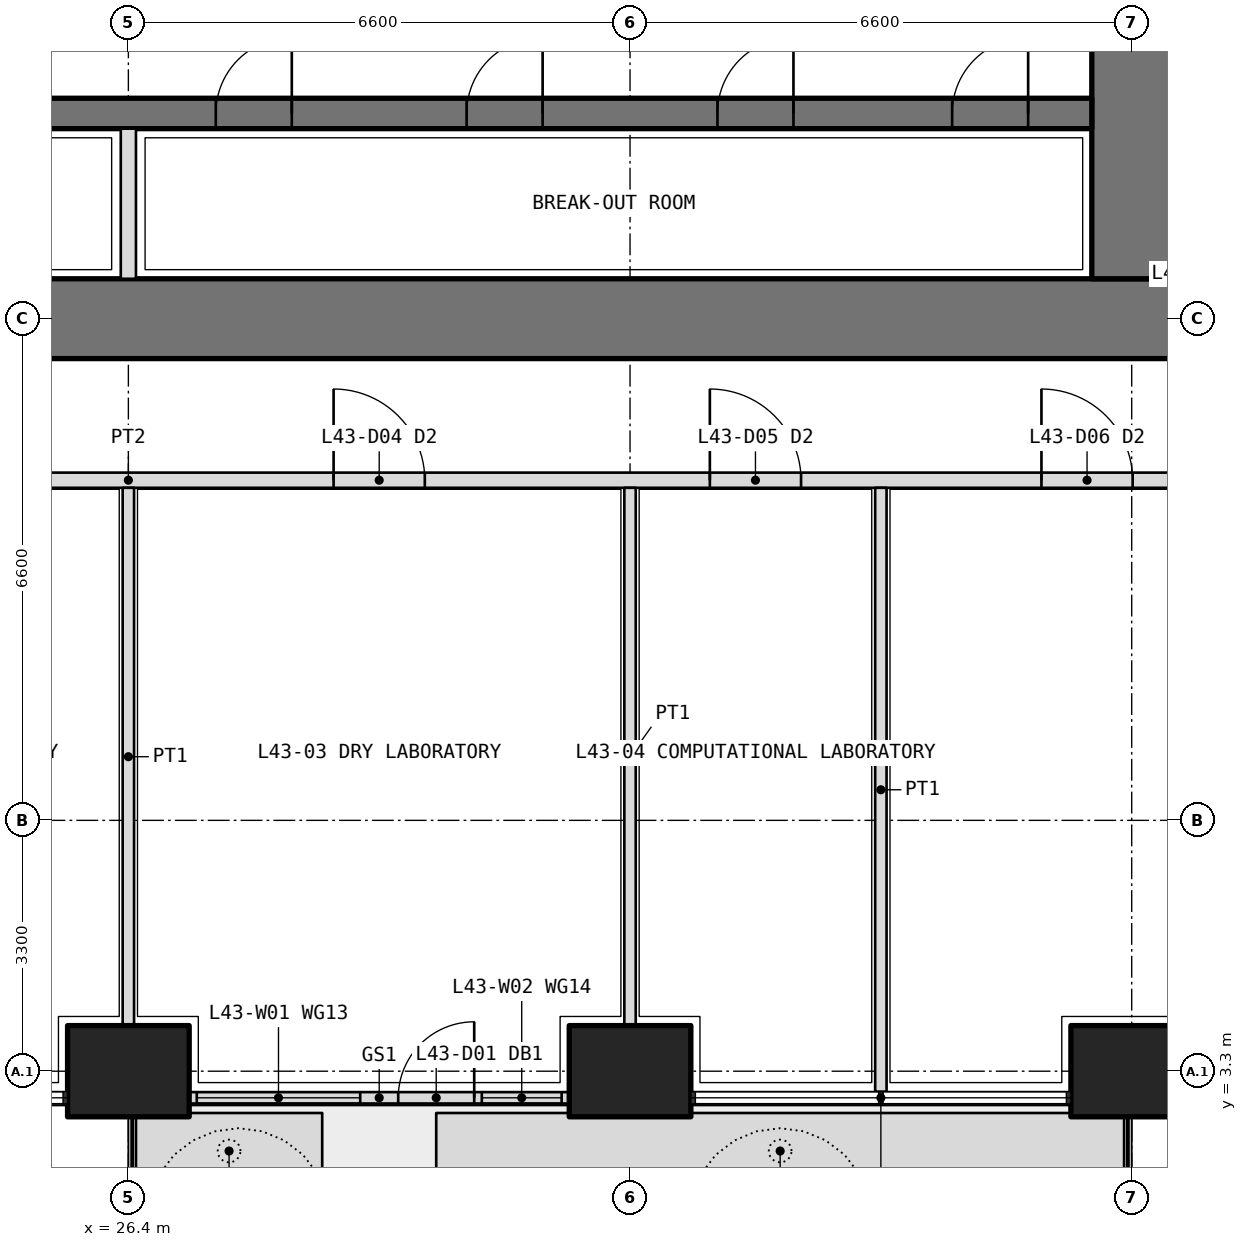
"""IFC4 building model, lengths in metres.
Left out: names, types, materials, properties, quantities, classifications, styles, units other than length and angle.
Written with IfcOpenShell. Run it as: python <this file> out.ifc"""

import sys

from ifc_helpers import new_model, si_unit, direction, frame, frame_2d, origin, origin_2d, place, context, subcontext, project, spatial, polyline, rectangle, outline, extrude, element, fill, save


model = new_model("IFC4")
c1 = context("Model", 3, precision=1e-05, world=origin(), true_north=direction((0.0, 1.0)))
c2 = subcontext(c1, "Body", "Model", "MODEL_VIEW")
j1 = project(units=[si_unit("LENGTHUNIT", "METRE"), si_unit("PLANEANGLEUNIT", "RADIAN")], contexts=[c1])
p1 = place(None, origin())
s1 = spatial("IfcSite", under=j1, at=p1, CompositionType="ELEMENT")
p2 = place(p1, origin())
s2 = spatial("IfcBuilding", under=s1, at=p2, CompositionType="ELEMENT")
p3 = place(p2, frame((0.0, 0.0, 189.3)))
s3 = spatial("IfcBuildingStorey", under=s2, at=p3, CompositionType="ELEMENT", Elevation=189.3)
for number, where, z_axis, x_axis in (
    (1, (26.4, 3.3, 0.0), (0.0, 0.0, 1.0), (1.0, 0.0, 0.0)),
    (2, (33.0, 3.3, 0.0), (0.0, 0.0, 1.0), (1.0, 0.0, 0.0)),
    (3, (39.6, 3.3, 0.0), (0.0, 0.0, 1.0), (1.0, 0.0, 0.0)),
):
    element("IfcColumn", number, at=place(p3, frame(where, z_axis=z_axis, x_axis=x_axis)), inside=s3, PredefinedType="COLUMN", context=c2, shape_type="SweptSolid", body=[
        extrude(rectangle(XDim=1.6, YDim=1.2, at=origin_2d()), origin(), (0.0, 0.0, 1.0), 4.2),
    ])
p4 = place(p3, origin())
e4 = element("IfcWall", 4, at=p4, inside=s3, PredefinedType="USERDEFINED", context=c2, shape_type="SweptSolid", body=[
    extrude(outline(polyline([(26.5, 1.75), (28.95, 1.75), (28.95, 2.75), (26.5, 2.75), (26.5, 1.75)]), holes=[polyline([(26.65, 1.9), (28.8, 1.9), (28.8, 2.6), (26.65, 2.6), (26.65, 1.9)])]), origin(), (0.0, 0.0, 1.0), 1.05),
])
p5 = place(p3, origin())
e5 = element("IfcWall", 5, at=p5, inside=s3, PredefinedType="USERDEFINED", context=c2, shape_type="SweptSolid", body=[
    extrude(outline(polyline([(30.45, 1.75), (39.5, 1.75), (39.5, 2.75), (30.45, 2.75), (30.45, 1.75)]), holes=[polyline([(30.6, 1.9), (39.35, 1.9), (39.35, 2.6), (30.6, 2.6), (30.6, 1.9)])]), origin(), (0.0, 0.0, 1.0), 1.05),
])
p6 = place(p3, frame((27.2, 2.95, 0.0), z_axis=(0.0, 0.0, 1.0), x_axis=(1.0, 0.0, 0.0)))
e6 = element("IfcWall", 6, at=p6, inside=s3, PredefinedType="SOLIDWALL", context=c2, shape_type="SweptSolid", body=[
    extrude(rectangle(XDim=5.0, YDim=0.15, at=frame_2d((2.5, 0.0))), origin(), (0.0, 0.0, 1.0), 2.7),
])
p7 = place(p6, frame((2.75, 0.0, 0.0)))
e7 = element("IfcOpeningElement", 7, at=p7, cuts=e6, PredefinedType="OPENING", context=c2, shape_type="SweptSolid", body=[
    extrude(rectangle(XDim=1.0, YDim=2.4, at=frame_2d((0.5, 1.2))), frame((0.0, 0.085, 0.0), z_axis=(0.0, -1.0, 0.0), x_axis=(1.0, 0.0, 0.0)), (0.0, 0.0, 1.0), 0.17),
])
p8 = place(p6, frame((0.1, 0.0, 0.1)))
e8 = element("IfcOpeningElement", 8, at=p8, cuts=e6, PredefinedType="OPENING", context=c2, shape_type="SweptSolid", body=[
    extrude(rectangle(XDim=2.15, YDim=2.3, at=frame_2d((1.075, 1.15))), frame((0.0, 0.085, 0.0), z_axis=(0.0, -1.0, 0.0), x_axis=(1.0, 0.0, 0.0)), (0.0, 0.0, 1.0), 0.17),
])
p9 = place(p6, frame((3.85, 0.0, 0.1)))
e9 = element("IfcOpeningElement", 9, at=p9, cuts=e6, PredefinedType="OPENING", context=c2, shape_type="SweptSolid", body=[
    extrude(rectangle(XDim=1.05, YDim=2.3, at=frame_2d((0.525, 1.15))), frame((0.0, 0.085, 0.0), z_axis=(0.0, -1.0, 0.0), x_axis=(1.0, 0.0, 0.0)), (0.0, 0.0, 1.0), 0.17),
])
p10 = place(p3, frame((12.675, 13.2, 0.0), z_axis=(0.0, 0.0, 1.0), x_axis=(1.0, 0.0, 0.0)))
e10 = element("IfcWall", 10, at=p10, inside=s3, PredefinedType="SHEAR", context=c2, shape_type="SweptSolid", body=[
    extrude(rectangle(XDim=27.45, YDim=1.05, at=frame_2d((13.725, 0.0))), origin(), (0.0, 0.0, 1.0), 4.2),
])
p11 = place(p3, frame((39.6, 13.725, 0.0), z_axis=(0.0, 0.0, 1.0), x_axis=(0.0, 1.0, 0.0)))
e11 = element("IfcWall", 11, at=p11, inside=s3, PredefinedType="SHEAR", context=c2, shape_type="SweptSolid", body=[
    extrude(rectangle(XDim=18.75, YDim=1.05, at=frame_2d((9.375, 0.0))), origin(), (0.0, 0.0, 1.0), 4.2),
])
p12 = place(p11, frame((3.025, 0.0, 0.0)))
e12 = element("IfcOpeningElement", 12, at=p12, cuts=e11, PredefinedType="OPENING", context=c2, shape_type="SweptSolid", body=[
    extrude(rectangle(XDim=1.6, YDim=2.1, at=frame_2d((0.8, 1.05))), frame((0.0, 0.535, 0.0), z_axis=(0.0, -1.0, 0.0), x_axis=(1.0, 0.0, 0.0)), (0.0, 0.0, 1.0), 1.07),
])
p13 = place(p11, frame((13.825, 0.0, 0.0)))
e13 = element("IfcOpeningElement", 13, at=p13, cuts=e11, PredefinedType="OPENING", context=c2, shape_type="SweptSolid", body=[
    extrude(rectangle(XDim=1.6, YDim=2.1, at=frame_2d((0.8, 1.05))), frame((0.0, 0.535, 0.0), z_axis=(0.0, -1.0, 0.0), x_axis=(1.0, 0.0, 0.0)), (0.0, 0.0, 1.0), 1.07),
])
p14 = place(p3, frame((13.725, 15.9, 0.0), z_axis=(0.0, 0.0, 1.0), x_axis=(1.0, 0.0, 0.0)))
e14 = element("IfcWall", 14, at=p14, inside=s3, PredefinedType="SHEAR", context=c2, shape_type="SweptSolid", body=[
    extrude(rectangle(XDim=25.35, YDim=0.4, at=frame_2d((12.675, 0.0))), origin(), (0.0, 0.0, 1.0), 4.2),
])
p15 = place(p14, frame((0.837, 0.0, 0.0)))
e15 = element("IfcOpeningElement", 15, at=p15, cuts=e14, PredefinedType="OPENING", context=c2, shape_type="SweptSolid", body=[
    extrude(rectangle(XDim=1.0, YDim=2.1, at=frame_2d((0.5, 1.05))), frame((0.0, 0.21, 0.0), z_axis=(0.0, -1.0, 0.0), x_axis=(1.0, 0.0, 0.0)), (0.0, 0.0, 1.0), 0.42),
])
p16 = place(p14, frame((3.925, 0.0, 0.0)))
e16 = element("IfcOpeningElement", 16, at=p16, cuts=e14, PredefinedType="OPENING", context=c2, shape_type="SweptSolid", body=[
    extrude(rectangle(XDim=1.0, YDim=2.1, at=frame_2d((0.5, 1.05))), frame((0.0, 0.21, 0.0), z_axis=(0.0, -1.0, 0.0), x_axis=(1.0, 0.0, 0.0)), (0.0, 0.0, 1.0), 0.42),
])
p17 = place(p14, frame((7.225, 0.0, 0.0)))
e17 = element("IfcOpeningElement", 17, at=p17, cuts=e14, PredefinedType="OPENING", context=c2, shape_type="SweptSolid", body=[
    extrude(rectangle(XDim=1.0, YDim=2.1, at=frame_2d((0.5, 1.05))), frame((0.0, 0.21, 0.0), z_axis=(0.0, -1.0, 0.0), x_axis=(1.0, 0.0, 0.0)), (0.0, 0.0, 1.0), 0.42),
])
p18 = place(p14, frame((10.525, 0.0, 0.0)))
e18 = element("IfcOpeningElement", 18, at=p18, cuts=e14, PredefinedType="OPENING", context=c2, shape_type="SweptSolid", body=[
    extrude(rectangle(XDim=1.0, YDim=2.1, at=frame_2d((0.5, 1.05))), frame((0.0, 0.21, 0.0), z_axis=(0.0, -1.0, 0.0), x_axis=(1.0, 0.0, 0.0)), (0.0, 0.0, 1.0), 0.42),
])
p19 = place(p14, frame((13.825, 0.0, 0.0)))
e19 = element("IfcOpeningElement", 19, at=p19, cuts=e14, PredefinedType="OPENING", context=c2, shape_type="SweptSolid", body=[
    extrude(rectangle(XDim=1.0, YDim=2.1, at=frame_2d((0.5, 1.05))), frame((0.0, 0.21, 0.0), z_axis=(0.0, -1.0, 0.0), x_axis=(1.0, 0.0, 0.0)), (0.0, 0.0, 1.0), 0.42),
])
p20 = place(p14, frame((17.125, 0.0, 0.0)))
e20 = element("IfcOpeningElement", 20, at=p20, cuts=e14, PredefinedType="OPENING", context=c2, shape_type="SweptSolid", body=[
    extrude(rectangle(XDim=1.0, YDim=2.1, at=frame_2d((0.5, 1.05))), frame((0.0, 0.21, 0.0), z_axis=(0.0, -1.0, 0.0), x_axis=(1.0, 0.0, 0.0)), (0.0, 0.0, 1.0), 0.42),
])
p21 = place(p14, frame((20.425, 0.0, 0.0)))
e21 = element("IfcOpeningElement", 21, at=p21, cuts=e14, PredefinedType="OPENING", context=c2, shape_type="SweptSolid", body=[
    extrude(rectangle(XDim=1.0, YDim=2.1, at=frame_2d((0.5, 1.05))), frame((0.0, 0.21, 0.0), z_axis=(0.0, -1.0, 0.0), x_axis=(1.0, 0.0, 0.0)), (0.0, 0.0, 1.0), 0.42),
])
p22 = place(p14, frame((23.512, 0.0, 0.0)))
e22 = element("IfcOpeningElement", 22, at=p22, cuts=e14, PredefinedType="OPENING", context=c2, shape_type="SweptSolid", body=[
    extrude(rectangle(XDim=1.0, YDim=2.1, at=frame_2d((0.5, 1.05))), frame((0.0, 0.21, 0.0), z_axis=(0.0, -1.0, 0.0), x_axis=(1.0, 0.0, 0.0)), (0.0, 0.0, 1.0), 0.42),
])
p23 = place(p3, frame((26.4, 13.725, 0.0), z_axis=(0.0, 0.0, 1.0), x_axis=(0.0, 1.0, 0.0)))
e23 = element("IfcWall", 23, at=p23, inside=s3, PredefinedType="PARTITIONING", context=c2, shape_type="SweptSolid", body=[
    extrude(rectangle(XDim=1.975, YDim=0.2, at=frame_2d((0.987, 0.0))), origin(), (0.0, 0.0, 1.0), 4.2),
])
p24 = place(p3, frame((10.975, 11.075, 0.0), z_axis=(0.0, 0.0, 1.0), x_axis=(1.0, 0.0, 0.0)))
e24 = element("IfcWall", 24, at=p24, inside=s3, PredefinedType="PARTITIONING", context=c2, shape_type="SweptSolid", body=[
    extrude(rectangle(XDim=30.85, YDim=0.2, at=frame_2d((15.425, 0.0))), origin(), (0.0, 0.0, 1.0), 2.85),
])
p25 = place(p24, frame((3.863, 0.0, 0.0)))
e25 = element("IfcOpeningElement", 25, at=p25, cuts=e24, PredefinedType="OPENING", context=c2, shape_type="SweptSolid", body=[
    extrude(rectangle(XDim=1.2, YDim=2.1, at=frame_2d((0.6, 1.05))), frame((0.0, 0.11, 0.0), z_axis=(0.0, -1.0, 0.0), x_axis=(1.0, 0.0, 0.0)), (0.0, 0.0, 1.0), 0.22),
])
p26 = place(p24, frame((11.525, 0.0, 0.0)))
e26 = element("IfcOpeningElement", 26, at=p26, cuts=e24, PredefinedType="OPENING", context=c2, shape_type="SweptSolid", body=[
    extrude(rectangle(XDim=1.2, YDim=2.1, at=frame_2d((0.6, 1.05))), frame((0.0, 0.11, 0.0), z_axis=(0.0, -1.0, 0.0), x_axis=(1.0, 0.0, 0.0)), (0.0, 0.0, 1.0), 0.22),
])
p27 = place(p24, frame((18.125, 0.0, 0.0)))
e27 = element("IfcOpeningElement", 27, at=p27, cuts=e24, PredefinedType="OPENING", context=c2, shape_type="SweptSolid", body=[
    extrude(rectangle(XDim=1.2, YDim=2.1, at=frame_2d((0.6, 1.05))), frame((0.0, 0.11, 0.0), z_axis=(0.0, -1.0, 0.0), x_axis=(1.0, 0.0, 0.0)), (0.0, 0.0, 1.0), 0.22),
])
p28 = place(p24, frame((23.075, 0.0, 0.0)))
e28 = element("IfcOpeningElement", 28, at=p28, cuts=e24, PredefinedType="OPENING", context=c2, shape_type="SweptSolid", body=[
    extrude(rectangle(XDim=1.2, YDim=2.1, at=frame_2d((0.6, 1.05))), frame((0.0, 0.11, 0.0), z_axis=(0.0, -1.0, 0.0), x_axis=(1.0, 0.0, 0.0)), (0.0, 0.0, 1.0), 0.22),
])
p29 = place(p24, frame((27.438, 0.0, 0.0)))
e29 = element("IfcOpeningElement", 29, at=p29, cuts=e24, PredefinedType="OPENING", context=c2, shape_type="SweptSolid", body=[
    extrude(rectangle(XDim=1.2, YDim=2.1, at=frame_2d((0.6, 1.05))), frame((0.0, 0.11, 0.0), z_axis=(0.0, -1.0, 0.0), x_axis=(1.0, 0.0, 0.0)), (0.0, 0.0, 1.0), 0.22),
])
for number, where, z_axis, x_axis in (
    (30, (26.4, 3.9, 0.0), (0.0, 0.0, 1.0), (0.0, 1.0, 0.0)),
    (31, (33.0, 3.9, 0.0), (0.0, 0.0, 1.0), (0.0, 1.0, 0.0)),
):
    element("IfcWall", number, at=place(p3, frame(where, z_axis=z_axis, x_axis=x_axis)), inside=s3, PredefinedType="PARTITIONING", context=c2, shape_type="SweptSolid", body=[
        extrude(rectangle(XDim=7.075, YDim=0.15, at=frame_2d((3.538, 0.0))), origin(), (0.0, 0.0, 1.0), 2.85),
    ])
p30 = place(p3, frame((36.3, 3.03, 0.0), z_axis=(0.0, 0.0, 1.0), x_axis=(0.0, 1.0, 0.0)))
e32 = element("IfcWall", 32, at=p30, inside=s3, PredefinedType="PARTITIONING", context=c2, shape_type="SweptSolid", body=[
    extrude(rectangle(XDim=7.945, YDim=0.15, at=frame_2d((3.973, 0.0))), origin(), (0.0, 0.0, 1.0), 2.7),
])
p31 = place(p7, origin())
e33 = element("IfcDoor", 33, at=p31, inside=s3, OperationType="SINGLE_SWING_RIGHT", PredefinedType="DOOR", context=c2, shape_type="SweptSolid", body=[
    extrude(rectangle(XDim=1.0, YDim=2.4, at=frame_2d((0.5, 1.2))), frame((0.0, 0.025, 0.0), z_axis=(0.0, -1.0, 0.0), x_axis=(1.0, 0.0, 0.0)), (0.0, 0.0, 1.0), 0.05),
])
fill(e7, e33)
p32 = place(p8, origin())
e34 = element("IfcWindow", 34, at=p32, inside=s3, PartitioningType="SINGLE_PANEL", PredefinedType="WINDOW", context=c2, shape_type="SweptSolid", body=[
    extrude(rectangle(XDim=2.15, YDim=2.3, at=frame_2d((1.075, 1.15))), frame((0.0, 0.03, 0.0), z_axis=(0.0, -1.0, 0.0), x_axis=(1.0, 0.0, 0.0)), (0.0, 0.0, 1.0), 0.06),
])
fill(e8, e34)
p33 = place(p9, origin())
e35 = element("IfcWindow", 35, at=p33, inside=s3, PartitioningType="SINGLE_PANEL", PredefinedType="WINDOW", context=c2, shape_type="SweptSolid", body=[
    extrude(rectangle(XDim=1.05, YDim=2.3, at=frame_2d((0.525, 1.15))), frame((0.0, 0.03, 0.0), z_axis=(0.0, -1.0, 0.0), x_axis=(1.0, 0.0, 0.0)), (0.0, 0.0, 1.0), 0.06),
])
fill(e9, e35)
p34 = place(p27, origin())
e36 = element("IfcDoor", 36, at=p34, inside=s3, OperationType="DOUBLE_DOOR_SINGLE_SWING", PredefinedType="DOOR", context=c2, shape_type="SweptSolid", body=[
    extrude(rectangle(XDim=1.2, YDim=2.1, at=frame_2d((0.6, 1.05))), frame((0.0, 0.025, 0.0), z_axis=(0.0, -1.0, 0.0), x_axis=(1.0, 0.0, 0.0)), (0.0, 0.0, 1.0), 0.05),
])
fill(e27, e36)
p35 = place(p28, origin())
e37 = element("IfcDoor", 37, at=p35, inside=s3, OperationType="DOUBLE_DOOR_SINGLE_SWING", PredefinedType="DOOR", context=c2, shape_type="SweptSolid", body=[
    extrude(rectangle(XDim=1.2, YDim=2.1, at=frame_2d((0.6, 1.05))), frame((0.0, 0.025, 0.0), z_axis=(0.0, -1.0, 0.0), x_axis=(1.0, 0.0, 0.0)), (0.0, 0.0, 1.0), 0.05),
])
fill(e28, e37)
p36 = place(p29, origin())
e38 = element("IfcDoor", 38, at=p36, inside=s3, OperationType="DOUBLE_DOOR_SINGLE_SWING", PredefinedType="DOOR", context=c2, shape_type="SweptSolid", body=[
    extrude(rectangle(XDim=1.2, YDim=2.1, at=frame_2d((0.6, 1.05))), frame((0.0, 0.025, 0.0), z_axis=(0.0, -1.0, 0.0), x_axis=(1.0, 0.0, 0.0)), (0.0, 0.0, 1.0), 0.05),
])
fill(e29, e38)
p37 = place(p19, origin())
e39 = element("IfcDoor", 39, at=p37, inside=s3, OperationType="SINGLE_SWING_RIGHT", PredefinedType="DOOR", context=c2, shape_type="SweptSolid", body=[
    extrude(rectangle(XDim=1.0, YDim=2.1, at=frame_2d((0.5, 1.05))), frame((0.0, 0.025, 0.0), z_axis=(0.0, -1.0, 0.0), x_axis=(1.0, 0.0, 0.0)), (0.0, 0.0, 1.0), 0.05),
])
fill(e19, e39)
p38 = place(p20, origin())
e40 = element("IfcDoor", 40, at=p38, inside=s3, OperationType="SINGLE_SWING_RIGHT", PredefinedType="DOOR", context=c2, shape_type="SweptSolid", body=[
    extrude(rectangle(XDim=1.0, YDim=2.1, at=frame_2d((0.5, 1.05))), frame((0.0, 0.025, 0.0), z_axis=(0.0, -1.0, 0.0), x_axis=(1.0, 0.0, 0.0)), (0.0, 0.0, 1.0), 0.05),
])
fill(e20, e40)
p39 = place(p21, origin())
e41 = element("IfcDoor", 41, at=p39, inside=s3, OperationType="SINGLE_SWING_RIGHT", PredefinedType="DOOR", context=c2, shape_type="SweptSolid", body=[
    extrude(rectangle(XDim=1.0, YDim=2.1, at=frame_2d((0.5, 1.05))), frame((0.0, 0.025, 0.0), z_axis=(0.0, -1.0, 0.0), x_axis=(1.0, 0.0, 0.0)), (0.0, 0.0, 1.0), 0.05),
])
fill(e21, e41)
p40 = place(p22, origin())
e42 = element("IfcDoor", 42, at=p40, inside=s3, OperationType="SINGLE_SWING_RIGHT", PredefinedType="DOOR", context=c2, shape_type="SweptSolid", body=[
    extrude(rectangle(XDim=1.0, YDim=2.1, at=frame_2d((0.5, 1.05))), frame((0.0, 0.025, 0.0), z_axis=(0.0, -1.0, 0.0), x_axis=(1.0, 0.0, 0.0)), (0.0, 0.0, 1.0), 0.05),
])
fill(e22, e42)
save(model, sys.argv[1])
